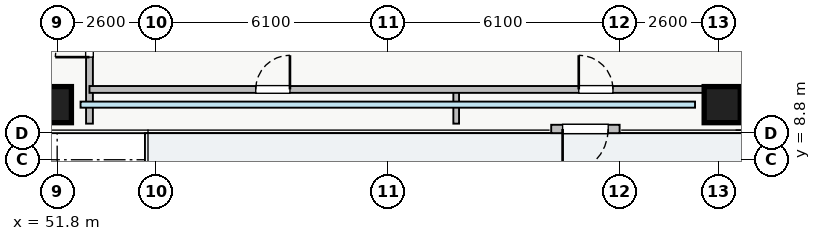
"""IFC4 building model, lengths in metres.
Left out: names, types, materials, properties, quantities, classifications, styles, units other than length and angle.
Written with IfcOpenShell. Run it as: python <this file> out.ifc"""

import sys

from ifc_helpers import new_model, si_unit, direction, frame, frame_2d, origin, origin_2d, place, context, subcontext, project, spatial, rectangle, extrude, source, transform, mapped, element, fill, save


model = new_model("IFC4")
c1 = context("Model", 3, precision=1e-05, world=origin(), true_north=direction((0.0, 1.0)))
c2 = subcontext(c1, "Body", "Model", "MODEL_VIEW")
j1 = project(units=[si_unit("LENGTHUNIT", "METRE"), si_unit("PLANEANGLEUNIT", "RADIAN")], contexts=[c1])
p1 = place(None, origin())
s1 = spatial("IfcSite", under=j1, at=p1, CompositionType="ELEMENT")
p2 = place(p1, origin())
s2 = spatial("IfcBuilding", under=s1, at=p2, CompositionType="ELEMENT")
p3 = place(p2, frame((0.0, 0.0, 23.0)))
s3 = spatial("IfcBuildingStorey", under=s2, at=p3, CompositionType="ELEMENT", Elevation=23.0)
m1 = source(origin(), c2, "Body", "SweptSolid", [
    extrude(rectangle(XDim=0.95, YDim=0.95, at=origin_2d()), origin(), (0.0, 0.0, 1.0), 3.25),
])
for number, where, z_axis, x_axis in (
    (1, (51.7, 10.25, 0.0), (0.0, 0.0, 1.0), (1.0, 0.0, 0.0)),
    (2, (69.3, 10.25, 0.0), (0.0, 0.0, 1.0), (1.0, 0.0, 0.0)),
):
    element("IfcColumn", number, at=place(p3, frame(where, z_axis=z_axis, x_axis=x_axis)), inside=s3, PredefinedType="COLUMN", context=c2, shape_type="MappedRepresentation", body=[
        mapped(m1, transform((0.0, 0.0, 0.0), x_axis=(1.0, 0.0, 0.0), y_axis=(0.0, 1.0, 0.0), z_axis=(0.0, 0.0, 1.0), scale=1.0)),
    ])
p4 = place(p3, frame((52.65, 9.75, 0.0), z_axis=(0.0, 0.0, 1.0), x_axis=(0.0, 1.0, 0.0)))
e3 = element("IfcWall", 3, at=p4, inside=s3, PredefinedType="PARTITIONING", context=c2, shape_type="SweptSolid", body=[
    extrude(rectangle(XDim=26.5, YDim=0.18, at=frame_2d((13.25, 0.0))), origin(), (0.0, 0.0, 1.0), 3.07),
])
p5 = place(p4, frame((23.85, 0.0, 0.0)))
e4 = element("IfcOpeningElement", 4, at=p5, cuts=e3, PredefinedType="OPENING", context=c2, shape_type="SweptSolid", body=[
    extrude(rectangle(XDim=0.9, YDim=2.05, at=frame_2d((0.45, 1.025))), frame((0.0, 0.1, 0.0), z_axis=(0.0, -1.0, 0.0), x_axis=(1.0, 0.0, 0.0)), (0.0, 0.0, 1.0), 0.2),
])
p6 = place(p4, frame((1.75, 0.0, 0.0)))
e5 = element("IfcOpeningElement", 5, at=p6, cuts=e3, PredefinedType="OPENING", context=c2, shape_type="SweptSolid", body=[
    extrude(rectangle(XDim=0.9, YDim=2.05, at=frame_2d((0.45, 1.025))), frame((0.0, 0.1, 0.0), z_axis=(0.0, -1.0, 0.0), x_axis=(1.0, 0.0, 0.0)), (0.0, 0.0, 1.0), 0.2),
])
p7 = place(p4, frame((5.145, 0.0, 0.0)))
e6 = element("IfcOpeningElement", 6, at=p7, cuts=e3, PredefinedType="OPENING", context=c2, shape_type="SweptSolid", body=[
    extrude(rectangle(XDim=1.0, YDim=2.05, at=frame_2d((0.5, 1.025))), frame((0.0, 0.1, 0.0), z_axis=(0.0, -1.0, 0.0), x_axis=(1.0, 0.0, 0.0)), (0.0, 0.0, 1.0), 0.2),
])
p8 = place(p4, frame((14.39, 0.0, 0.0)))
e7 = element("IfcOpeningElement", 7, at=p8, cuts=e3, PredefinedType="OPENING", context=c2, shape_type="SweptSolid", body=[
    extrude(rectangle(XDim=1.0, YDim=2.05, at=frame_2d((0.5, 1.025))), frame((0.0, 0.1, 0.0), z_axis=(0.0, -1.0, 0.0), x_axis=(1.0, 0.0, 0.0)), (0.0, 0.0, 1.0), 0.2),
])
for number, where, z_axis, x_axis in (
    (8, (62.3, 9.75, 0.0), (0.0, 0.0, 1.0), (0.0, 1.0, 0.0)),
    (9, (69.65, 9.75, 0.0), (0.0, 0.0, 1.0), (0.0, 1.0, 0.0)),
):
    element("IfcWall", number, at=place(p3, frame(where, z_axis=z_axis, x_axis=x_axis)), inside=s3, PredefinedType="PARTITIONING", context=c2, shape_type="SweptSolid", body=[
        extrude(rectangle(XDim=0.9, YDim=0.15, at=frame_2d((0.45, 0.0))), origin(), (0.0, 0.0, 1.0), 3.07),
    ])
p9 = place(p3, frame((52.65, 10.65, 0.0), z_axis=(0.0, 0.0, 1.0), x_axis=(1.0, 0.0, 0.0)))
e10 = element("IfcWall", 10, at=p9, inside=s3, PredefinedType="PARTITIONING", context=c2, shape_type="SweptSolid", body=[
    extrude(rectangle(XDim=17.0, YDim=0.18, at=frame_2d((8.5, 0.0))), origin(), (0.0, 0.0, 1.0), 3.07),
])
p10 = place(p9, frame((4.375, 0.0, 0.0)))
e11 = element("IfcOpeningElement", 11, at=p10, cuts=e10, PredefinedType="OPENING", context=c2, shape_type="SweptSolid", body=[
    extrude(rectangle(XDim=0.9, YDim=2.05, at=frame_2d((0.45, 1.025))), frame((0.0, 0.1, 0.0), z_axis=(0.0, -1.0, 0.0), x_axis=(1.0, 0.0, 0.0)), (0.0, 0.0, 1.0), 0.2),
])
p11 = place(p9, frame((12.875, 0.0, 0.0)))
e12 = element("IfcOpeningElement", 12, at=p11, cuts=e10, PredefinedType="OPENING", context=c2, shape_type="SweptSolid", body=[
    extrude(rectangle(XDim=0.9, YDim=2.05, at=frame_2d((0.45, 1.025))), frame((0.0, 0.1, 0.0), z_axis=(0.0, -1.0, 0.0), x_axis=(1.0, 0.0, 0.0)), (0.0, 0.0, 1.0), 0.2),
])
p12 = place(p3, frame((64.8, 9.61, 0.0), z_axis=(0.0, 0.0, 1.0), x_axis=(1.0, 0.0, 0.0)))
e13 = element("IfcWall", 13, at=p12, inside=s3, PredefinedType="STANDARD", context=c2, shape_type="SweptSolid", body=[
    extrude(rectangle(XDim=1.8, YDim=0.22, at=frame_2d((0.9, 0.0))), origin(), (0.0, 0.0, 1.0), 2.61),
])
p13 = place(p12, frame((0.3, 0.0, 0.0)))
e14 = element("IfcOpeningElement", 14, at=p13, cuts=e13, PredefinedType="OPENING", context=c2, shape_type="SweptSolid", body=[
    extrude(rectangle(XDim=1.2, YDim=2.1, at=frame_2d((0.6, 1.05))), frame((0.0, 0.12, 0.0), z_axis=(0.0, -1.0, 0.0), x_axis=(1.0, 0.0, 0.0)), (0.0, 0.0, 1.0), 0.24),
])
m2 = source(origin(), c2, "Body", "SweptSolid", [
    extrude(rectangle(XDim=0.9, YDim=2.05, at=frame_2d((0.45, 1.025))), frame((0.0, 0.025, 0.0), z_axis=(0.0, -1.0, 0.0), x_axis=(1.0, 0.0, 0.0)), (0.0, 0.0, 1.0), 0.05),
])
p14 = place(p6, origin())
e15 = element("IfcDoor", 15, at=p14, inside=s3, OperationType="SINGLE_SWING_LEFT", PredefinedType="DOOR", context=c2, shape_type="MappedRepresentation", body=[
    mapped(m2, transform((0.0, 0.0, 0.0), x_axis=(1.0, 0.0, 0.0), y_axis=(0.0, 1.0, 0.0), z_axis=(0.0, 0.0, 1.0), scale=1.0)),
])
fill(e5, e15)
p15 = place(p10, origin())
e16 = element("IfcDoor", 16, at=p15, inside=s3, OperationType="SINGLE_SWING_RIGHT", PredefinedType="DOOR", context=c2, shape_type="MappedRepresentation", body=[
    mapped(m2, transform((0.0, 0.0, 0.0), x_axis=(1.0, 0.0, 0.0), y_axis=(0.0, 1.0, 0.0), z_axis=(0.0, 0.0, 1.0), scale=1.0)),
])
fill(e11, e16)
p16 = place(p11, origin())
e17 = element("IfcDoor", 17, at=p16, inside=s3, OperationType="SINGLE_SWING_LEFT", PredefinedType="DOOR", context=c2, shape_type="MappedRepresentation", body=[
    mapped(m2, transform((0.0, 0.0, 0.0), x_axis=(1.0, 0.0, 0.0), y_axis=(0.0, 1.0, 0.0), z_axis=(0.0, 0.0, 1.0), scale=1.0)),
])
fill(e12, e17)
m3 = source(origin(), c2, "Body", "SweptSolid", [
    extrude(rectangle(XDim=1.2, YDim=2.1, at=frame_2d((0.6, 1.05))), frame((0.0, 0.025, 0.0), z_axis=(0.0, -1.0, 0.0), x_axis=(1.0, 0.0, 0.0)), (0.0, 0.0, 1.0), 0.05),
])
p17 = place(p13, frame((1.2, 0.0, 0.0), z_axis=(0.0, 0.0, 1.0), x_axis=(-1.0, 0.0, 0.0)))
e18 = element("IfcDoor", 18, at=p17, inside=s3, OperationType="SINGLE_SWING_LEFT", PredefinedType="DOOR", context=c2, shape_type="MappedRepresentation", body=[
    mapped(m3, transform((0.0, 0.0, 0.0), x_axis=(1.0, 0.0, 0.0), y_axis=(0.0, 1.0, 0.0), z_axis=(0.0, 0.0, 1.0), scale=1.0)),
])
fill(e14, e18)
save(model, sys.argv[1])
